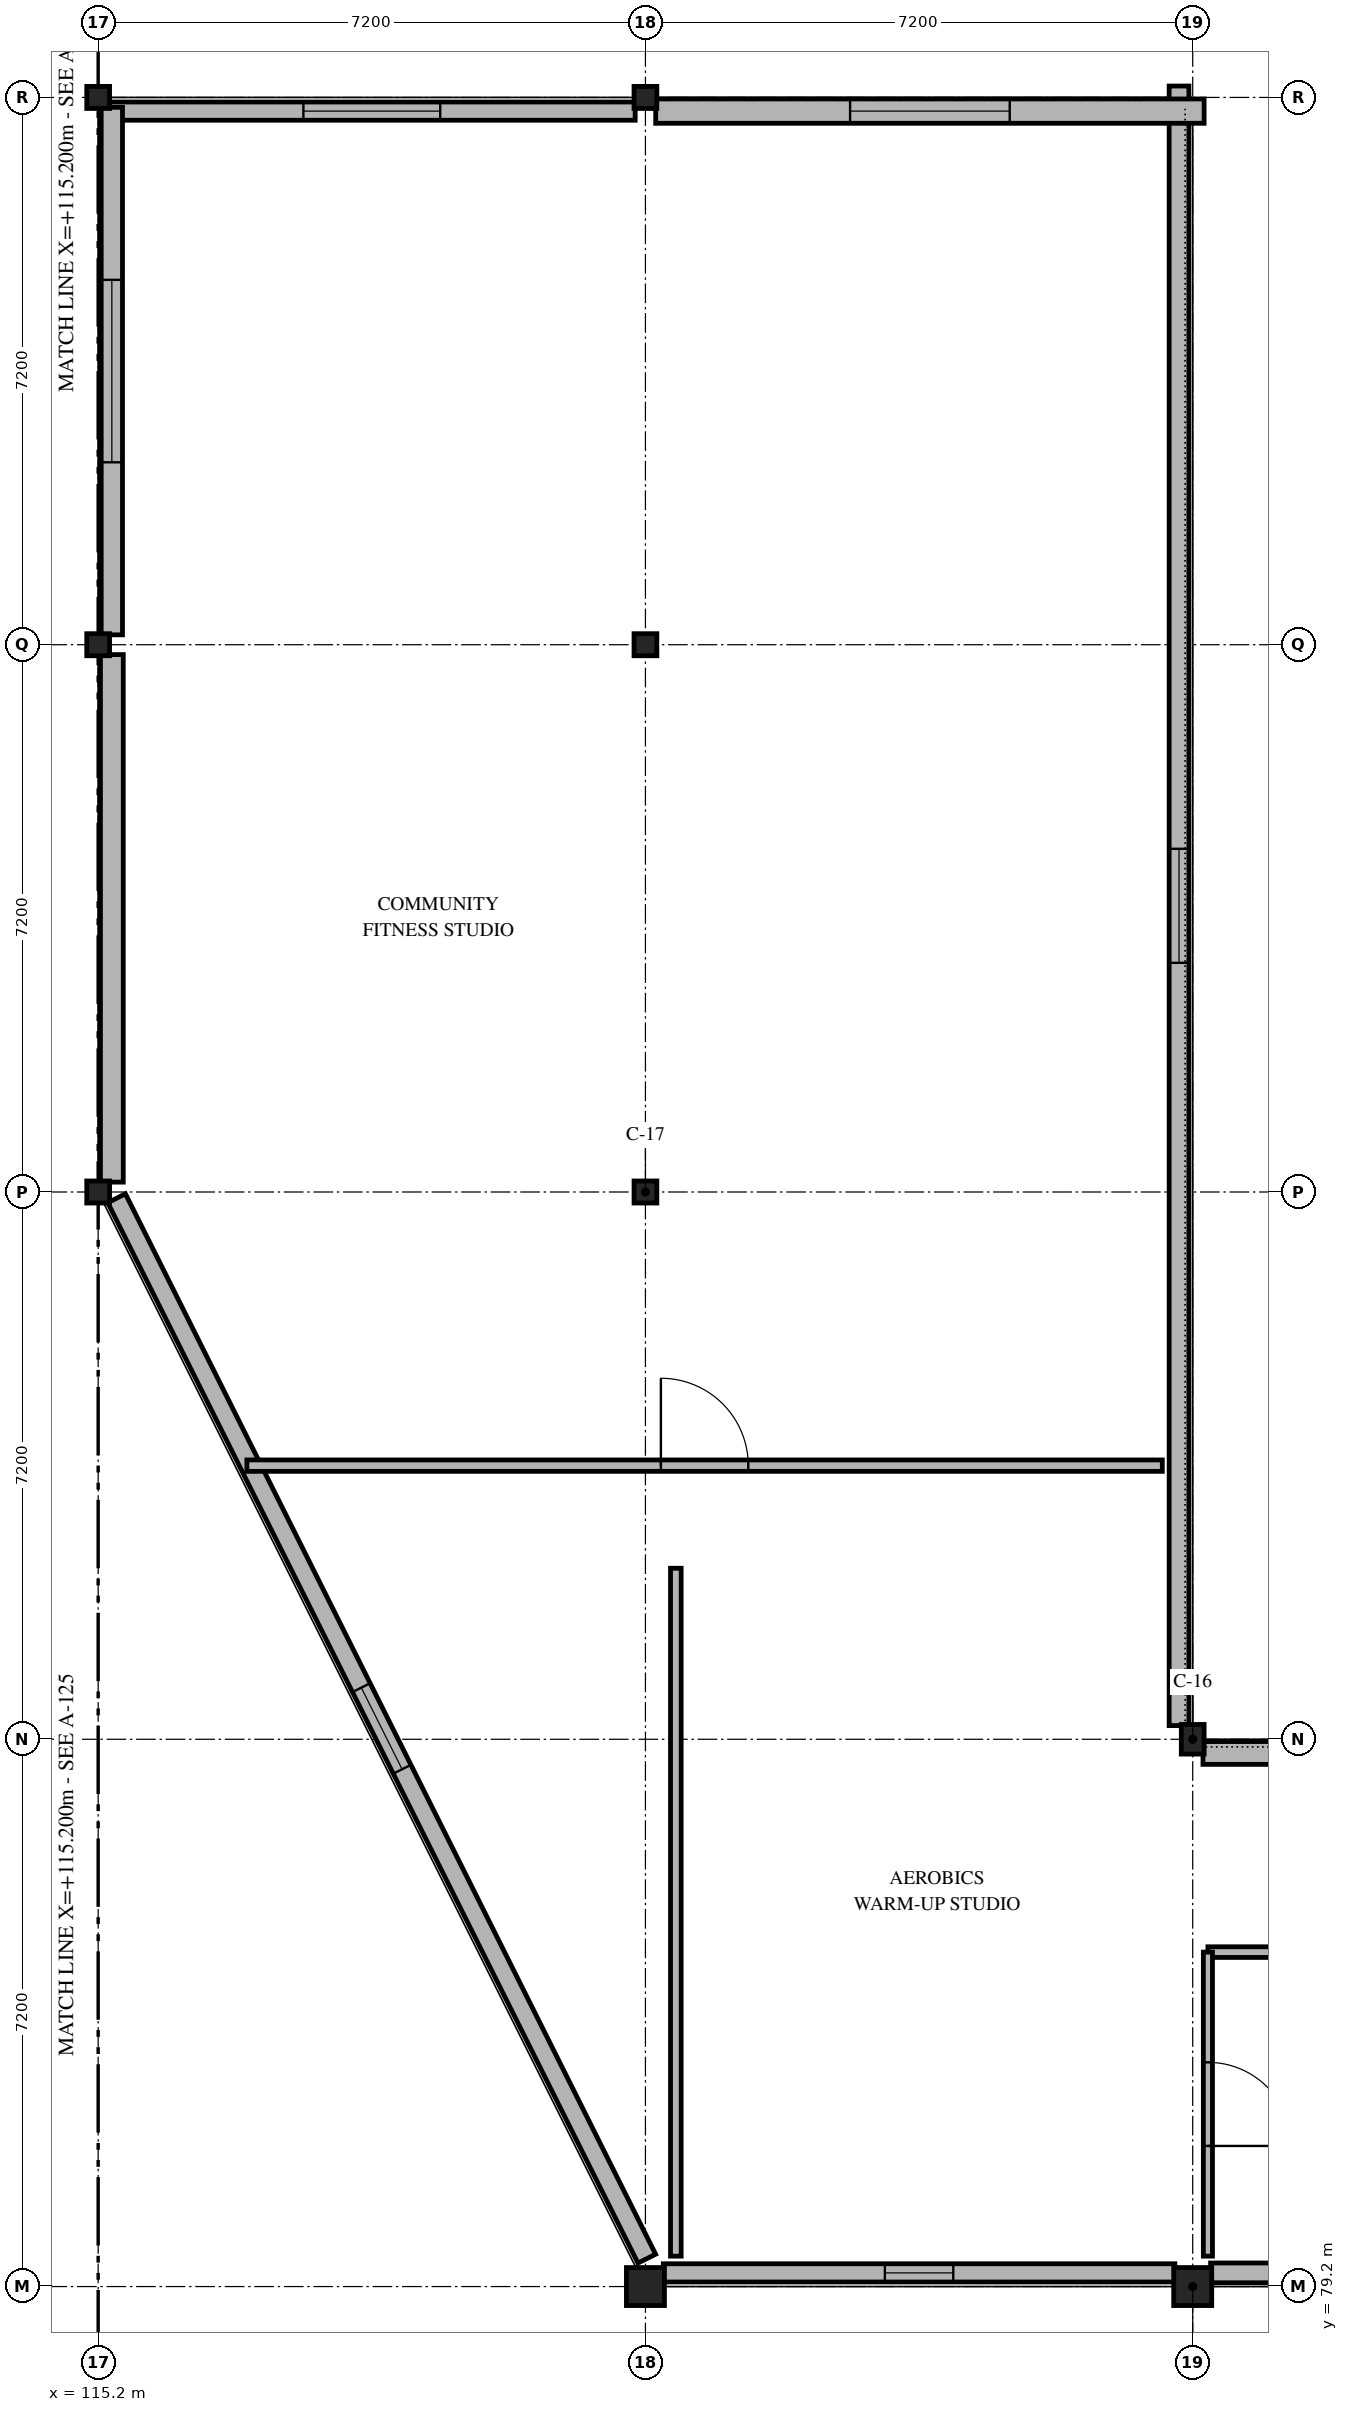
"""IFC4 building model, lengths in metres.
Left out: names, types, materials, properties, quantities, classifications, styles, units other than length and angle.
Written with IfcOpenShell. Run it as: python <this file> out.ifc"""

import sys

from ifc_helpers import new_model, si_unit, direction, frame, frame_2d, origin, origin_2d, place, context, subcontext, project, spatial, rectangle, i_section, extrude, element, fill, save


model = new_model("IFC4")
c1 = context("Model", 3, precision=1e-05, world=origin(), true_north=direction((0.0, 1.0)))
c2 = subcontext(c1, "Body", "Model", "MODEL_VIEW")
j1 = project(units=[si_unit("LENGTHUNIT", "METRE"), si_unit("PLANEANGLEUNIT", "RADIAN")], contexts=[c1])
p1 = place(None, origin())
s1 = spatial("IfcSite", under=j1, at=p1, CompositionType="ELEMENT")
p2 = place(p1, origin())
s2 = spatial("IfcBuilding", under=s1, at=p2, CompositionType="ELEMENT")
p3 = place(p2, frame((0.0, 0.0, 4.5)))
s3 = spatial("IfcBuildingStorey", under=s2, at=p3, CompositionType="ELEMENT", Elevation=4.5)
p4 = place(p3, frame((129.6, 86.4, 0.0), z_axis=(0.0, 0.0, 1.0), x_axis=(1.0, 0.0, 0.0)))
e1 = element("IfcColumn", 1, at=p4, inside=s3, PredefinedType="COLUMN", context=c2, shape_type="SweptSolid", body=[
    extrude(i_section(OverallWidth=0.3, OverallDepth=0.39, WebThickness=0.011, FlangeThickness=0.019, FilletRadius=0.027, at=origin_2d()), origin(), (0.0, 0.0, 1.0), 4.2),
])
p5 = place(p3, frame((129.6, 79.2, 0.0), z_axis=(0.0, 0.0, 1.0), x_axis=(1.0, 0.0, 0.0)))
e2 = element("IfcColumn", 2, at=p5, inside=s3, PredefinedType="COLUMN", context=c2, shape_type="SweptSolid", body=[
    extrude(rectangle(XDim=0.5, YDim=0.5, at=origin_2d()), origin(), (0.0, 0.0, 1.0), 4.2),
])
for number, where, z_axis, x_axis in (
    (3, (115.2, 93.6, 0.0), (0.0, 0.0, 1.0), (1.0, 0.0, 0.0)),
    (4, (122.4, 93.6, 0.0), (0.0, 0.0, 1.0), (1.0, 0.0, 0.0)),
    (5, (115.2, 100.8, 0.0), (0.0, 0.0, 1.0), (1.0, 0.0, 0.0)),
    (6, (122.4, 100.8, 0.0), (0.0, 0.0, 1.0), (1.0, 0.0, 0.0)),
    (7, (115.2, 108.0, 0.0), (0.0, 0.0, 1.0), (1.0, 0.0, 0.0)),
    (8, (122.4, 108.0, 0.0), (0.0, 0.0, 1.0), (1.0, 0.0, 0.0)),
):
    element("IfcColumn", number, at=place(p3, frame(where, z_axis=z_axis, x_axis=x_axis)), inside=s3, PredefinedType="COLUMN", context=c2, shape_type="SweptSolid", body=[
        extrude(i_section(OverallWidth=0.3, OverallDepth=0.29, WebThickness=0.009, FlangeThickness=0.014, FilletRadius=0.027, at=origin_2d()), origin(), (0.0, 0.0, 1.0), 4.2),
    ])
p6 = place(p3, frame((122.4, 79.2, 0.0), z_axis=(0.0, 0.0, 1.0), x_axis=(1.0, 0.0, 0.0)))
e9 = element("IfcColumn", 9, at=p6, inside=s3, PredefinedType="COLUMN", context=c2, shape_type="SweptSolid", body=[
    extrude(rectangle(XDim=0.5, YDim=0.5, at=origin_2d()), origin(), (0.0, 0.0, 1.0), 4.2),
])
p7 = place(p3, frame((135.365, 79.38, 0.0), z_axis=(0.0, 0.0, 1.0), x_axis=(-1.0, 0.0, 0.0)))
e10 = element("IfcWall", 10, at=p7, inside=s3, PredefinedType="SOLIDWALL", context=c2, shape_type="SweptSolid", body=[
    extrude(rectangle(XDim=5.53, YDim=0.26, at=frame_2d((2.765, 0.0))), origin(), (0.0, 0.0, 1.0), 3.59),
])
p8 = place(p7, frame((1.765, 0.0, 0.9)))
e11 = element("IfcOpeningElement", 11, at=p8, cuts=e10, PredefinedType="OPENING", context=c2, shape_type="SweptSolid", body=[
    extrude(rectangle(XDim=2.0, YDim=0.85, at=frame_2d((1.0, 0.425))), frame((0.0, 0.14, 0.0), z_axis=(0.0, -1.0, 0.0), x_axis=(1.0, 0.0, 0.0)), (0.0, 0.0, 1.0), 0.28),
])
p9 = place(p3, frame((129.365, 79.38, 0.0), z_axis=(0.0, 0.0, 1.0), x_axis=(-1.0, 0.0, 0.0)))
e12 = element("IfcWall", 12, at=p9, inside=s3, PredefinedType="SOLIDWALL", context=c2, shape_type="SweptSolid", body=[
    extrude(rectangle(XDim=6.73, YDim=0.24, at=frame_2d((3.365, 0.0))), origin(), (0.0, 0.0, 1.0), 3.5),
])
p10 = place(p9, frame((2.915, 0.0, 0.9)))
e13 = element("IfcOpeningElement", 13, at=p10, cuts=e12, PredefinedType="OPENING", context=c2, shape_type="SweptSolid", body=[
    extrude(rectangle(XDim=0.9, YDim=1.2, at=frame_2d((0.45, 0.6))), frame((0.0, 0.13, 0.0), z_axis=(0.0, -1.0, 0.0), x_axis=(1.0, 0.0, 0.0)), (0.0, 0.0, 1.0), 0.26),
])
p11 = place(p3, frame((129.735, 86.22, 0.0), z_axis=(0.0, 0.0, 1.0), x_axis=(1.0, 0.0, 0.0)))
e14 = element("IfcWall", 14, at=p11, inside=s3, PredefinedType="SOLIDWALL", context=c2, shape_type="SweptSolid", body=[
    extrude(rectangle(XDim=5.73, YDim=0.3, at=frame_2d((2.865, 0.0))), origin(), (0.0, 0.0, 1.0), 3.55),
])
p12 = place(p11, frame((2.265, 0.0, 0.9)))
e15 = element("IfcOpeningElement", 15, at=p12, cuts=e14, PredefinedType="OPENING", context=c2, shape_type="SweptSolid", body=[
    extrude(rectangle(XDim=1.2, YDim=1.2, at=frame_2d((0.6, 0.6))), frame((0.0, 0.16, 0.0), z_axis=(0.0, -1.0, 0.0), x_axis=(1.0, 0.0, 0.0)), (0.0, 0.0, 1.0), 0.32),
])
p13 = place(p3, frame((129.42, 108.15, 0.0), z_axis=(0.0, 0.0, 1.0), x_axis=(0.0, -1.0, 0.0)))
e16 = element("IfcWall", 16, at=p13, inside=s3, PredefinedType="SOLIDWALL", context=c2, shape_type="SweptSolid", body=[
    extrude(rectangle(XDim=21.57, YDim=0.26, at=frame_2d((10.785, 0.0))), origin(), (0.0, 0.0, 1.0), 3.95),
])
p14 = place(p13, frame((10.035, 0.0, 0.9)))
e17 = element("IfcOpeningElement", 17, at=p14, cuts=e16, PredefinedType="OPENING", context=c2, shape_type="SweptSolid", body=[
    extrude(rectangle(XDim=1.5, YDim=1.35, at=frame_2d((0.75, 0.675))), frame((0.0, 0.14, 0.0), z_axis=(0.0, -1.0, 0.0), x_axis=(1.0, 0.0, 0.0)), (0.0, 0.0, 1.0), 0.28),
])
p15 = place(p3, frame((115.335, 107.82, 0.0), z_axis=(0.0, 0.0, 1.0), x_axis=(1.0, 0.0, 0.0)))
e18 = element("IfcWall", 18, at=p15, inside=s3, PredefinedType="SOLIDWALL", context=c2, shape_type="SweptSolid", body=[
    extrude(rectangle(XDim=6.93, YDim=0.24, at=frame_2d((3.465, 0.0))), origin(), (0.0, 0.0, 1.0), 3.95),
])
p16 = place(p15, frame((2.565, 0.0, 0.9)))
e19 = element("IfcOpeningElement", 19, at=p16, cuts=e18, PredefinedType="OPENING", context=c2, shape_type="SweptSolid", body=[
    extrude(rectangle(XDim=1.8, YDim=1.35, at=frame_2d((0.9, 0.675))), frame((0.0, 0.13, 0.0), z_axis=(0.0, -1.0, 0.0), x_axis=(1.0, 0.0, 0.0)), (0.0, 0.0, 1.0), 0.26),
])
p17 = place(p3, frame((122.535, 107.82, 0.0), z_axis=(0.0, 0.0, 1.0), x_axis=(1.0, 0.0, 0.0)))
e20 = element("IfcWall", 20, at=p17, inside=s3, PredefinedType="SOLIDWALL", context=c2, shape_type="SweptSolid", body=[
    extrude(rectangle(XDim=7.215, YDim=0.32, at=frame_2d((3.607, 0.0))), origin(), (0.0, 0.0, 1.0), 3.95),
])
p18 = place(p17, frame((2.558, 0.0, 0.9)))
e21 = element("IfcOpeningElement", 21, at=p18, cuts=e20, PredefinedType="OPENING", context=c2, shape_type="SweptSolid", body=[
    extrude(rectangle(XDim=2.1, YDim=1.35, at=frame_2d((1.05, 0.675))), frame((0.0, 0.17, 0.0), z_axis=(0.0, -1.0, 0.0), x_axis=(1.0, 0.0, 0.0)), (0.0, 0.0, 1.0), 0.34),
])
p19 = place(p3, frame((115.38, 93.73, 0.0), z_axis=(0.0, 0.0, 1.0), x_axis=(0.0, 1.0, 0.0)))
e22 = element("IfcWall", 22, at=p19, inside=s3, PredefinedType="SOLIDWALL", context=c2, shape_type="SweptSolid", body=[
    extrude(rectangle(XDim=6.94, YDim=0.3, at=frame_2d((3.47, 0.0))), origin(), (0.0, 0.0, 1.0), 3.95),
])
p20 = place(p3, frame((115.38, 100.93, 0.0), z_axis=(0.0, 0.0, 1.0), x_axis=(0.0, 1.0, 0.0)))
e23 = element("IfcWall", 23, at=p20, inside=s3, PredefinedType="SOLIDWALL", context=c2, shape_type="SweptSolid", body=[
    extrude(rectangle(XDim=6.94, YDim=0.28, at=frame_2d((3.47, 0.0))), origin(), (0.0, 0.0, 1.0), 3.95),
])
p21 = place(p20, frame((2.27, 0.0, 0.9)))
e24 = element("IfcOpeningElement", 24, at=p21, cuts=e23, PredefinedType="OPENING", context=c2, shape_type="SweptSolid", body=[
    extrude(rectangle(XDim=2.4, YDim=1.35, at=frame_2d((1.2, 0.675))), frame((0.0, 0.15, 0.0), z_axis=(0.0, -1.0, 0.0), x_axis=(1.0, 0.0, 0.0)), (0.0, 0.0, 1.0), 0.3),
])
p22 = place(p3, frame((122.418, 79.567, 0.0), z_axis=(0.0, 0.0, 1.0), x_axis=(-0.4472135955, 0.894427191, 0.0)))
e25 = element("IfcWall", 25, at=p22, inside=s3, PredefinedType="SOLIDWALL", context=c2, shape_type="SweptSolid", body=[
    extrude(rectangle(XDim=15.597, YDim=0.26, at=frame_2d((7.799, 0.0))), origin(), (0.0, 0.0, 1.0), 3.95),
])
p23 = place(p22, frame((7.199, 0.0, 0.75)))
e26 = element("IfcOpeningElement", 26, at=p23, cuts=e25, PredefinedType="OPENING", context=c2, shape_type="SweptSolid", body=[
    extrude(rectangle(XDim=1.2, YDim=1.5, at=frame_2d((0.6, 0.75))), frame((0.0, 0.14, 0.0), z_axis=(0.0, -1.0, 0.0), x_axis=(1.0, 0.0, 0.0)), (0.0, 0.0, 1.0), 0.28),
])
p24 = place(p3, frame((157.8, 83.6, 0.0), z_axis=(0.0, 0.0, 1.0), x_axis=(-1.0, 0.0, 0.0)))
e27 = element("IfcWall", 27, at=p24, inside=s3, PredefinedType="PARTITIONING", context=c2, shape_type="SweptSolid", body=[
    extrude(rectangle(XDim=28.0, YDim=0.14, at=frame_2d((14.0, 0.0))), origin(), (0.0, 0.0, 1.0), 3.55),
])
p25 = place(p24, frame((13.375, 0.0, 0.0)))
e28 = element("IfcOpeningElement", 28, at=p25, cuts=e27, PredefinedType="OPENING", context=c2, shape_type="SweptSolid", body=[
    extrude(rectangle(XDim=1.25, YDim=2.2, at=frame_2d((0.625, 1.1))), frame((0.0, 0.08, 0.0), z_axis=(0.0, -1.0, 0.0), x_axis=(1.0, 0.0, 0.0)), (0.0, 0.0, 1.0), 0.16),
])
p26 = place(p3, frame((129.8, 83.6, 0.0), z_axis=(0.0, 0.0, 1.0), x_axis=(0.0, -1.0, 0.0)))
e29 = element("IfcWall", 29, at=p26, inside=s3, PredefinedType="PARTITIONING", context=c2, shape_type="SweptSolid", body=[
    extrude(rectangle(XDim=4.0, YDim=0.12, at=frame_2d((2.0, 0.0))), origin(), (0.0, 0.0, 1.0), 3.65),
])
p27 = place(p26, frame((1.45, 0.0, 0.0)))
e30 = element("IfcOpeningElement", 30, at=p27, cuts=e29, PredefinedType="OPENING", context=c2, shape_type="SweptSolid", body=[
    extrude(rectangle(XDim=1.1, YDim=2.15, at=frame_2d((0.55, 1.075))), frame((0.0, 0.07, 0.0), z_axis=(0.0, -1.0, 0.0), x_axis=(1.0, 0.0, 0.0)), (0.0, 0.0, 1.0), 0.14),
])
p28 = place(p3, frame((117.156, 90.0, 0.0), z_axis=(0.0, 0.0, 1.0), x_axis=(1.0, 0.0, 0.0)))
e31 = element("IfcWall", 31, at=p28, inside=s3, PredefinedType="PARTITIONING", context=c2, shape_type="SweptSolid", body=[
    extrude(rectangle(XDim=12.043, YDim=0.15, at=frame_2d((6.022, 0.0))), origin(), (0.0, 0.0, 1.0), 3.95),
])
p29 = place(p28, frame((5.447, 0.0, 0.0)))
e32 = element("IfcOpeningElement", 32, at=p29, cuts=e31, PredefinedType="OPENING", context=c2, shape_type="SweptSolid", body=[
    extrude(rectangle(XDim=1.15, YDim=2.15, at=frame_2d((0.575, 1.075))), frame((0.0, 0.085, 0.0), z_axis=(0.0, -1.0, 0.0), x_axis=(1.0, 0.0, 0.0)), (0.0, 0.0, 1.0), 0.17),
])
p30 = place(p3, frame((122.8, 88.65, 0.0), z_axis=(0.0, 0.0, 1.0), x_axis=(0.0, -1.0, 0.0)))
e33 = element("IfcWall", 33, at=p30, inside=s3, PredefinedType="PARTITIONING", context=c2, shape_type="SweptSolid", body=[
    extrude(rectangle(XDim=9.05, YDim=0.14, at=frame_2d((4.525, 0.0))), origin(), (0.0, 0.0, 1.0), 3.95),
])
p31 = place(p10, origin())
e34 = element("IfcWindow", 34, at=p31, inside=s3, PartitioningType="SINGLE_PANEL", PredefinedType="WINDOW", context=c2, shape_type="SweptSolid", body=[
    extrude(rectangle(XDim=0.9, YDim=1.2, at=frame_2d((0.45, 0.6))), frame((0.0, 0.03, 0.0), z_axis=(0.0, -1.0, 0.0), x_axis=(1.0, 0.0, 0.0)), (0.0, 0.0, 1.0), 0.06),
])
fill(e13, e34)
p32 = place(p14, origin())
e35 = element("IfcWindow", 35, at=p32, inside=s3, PartitioningType="SINGLE_PANEL", PredefinedType="WINDOW", context=c2, shape_type="SweptSolid", body=[
    extrude(rectangle(XDim=1.5, YDim=1.35, at=frame_2d((0.75, 0.675))), frame((0.0, 0.03, 0.0), z_axis=(0.0, -1.0, 0.0), x_axis=(1.0, 0.0, 0.0)), (0.0, 0.0, 1.0), 0.06),
])
fill(e17, e35)
p33 = place(p16, origin())
e36 = element("IfcWindow", 36, at=p33, inside=s3, PartitioningType="SINGLE_PANEL", PredefinedType="WINDOW", context=c2, shape_type="SweptSolid", body=[
    extrude(rectangle(XDim=1.8, YDim=1.35, at=frame_2d((0.9, 0.675))), frame((0.0, 0.03, 0.0), z_axis=(0.0, -1.0, 0.0), x_axis=(1.0, 0.0, 0.0)), (0.0, 0.0, 1.0), 0.06),
])
fill(e19, e36)
p34 = place(p18, origin())
e37 = element("IfcWindow", 37, at=p34, inside=s3, PartitioningType="SINGLE_PANEL", PredefinedType="WINDOW", context=c2, shape_type="SweptSolid", body=[
    extrude(rectangle(XDim=2.1, YDim=1.35, at=frame_2d((1.05, 0.675))), frame((0.0, 0.03, 0.0), z_axis=(0.0, -1.0, 0.0), x_axis=(1.0, 0.0, 0.0)), (0.0, 0.0, 1.0), 0.06),
])
fill(e21, e37)
p35 = place(p21, origin())
e38 = element("IfcWindow", 38, at=p35, inside=s3, PartitioningType="SINGLE_PANEL", PredefinedType="WINDOW", context=c2, shape_type="SweptSolid", body=[
    extrude(rectangle(XDim=2.4, YDim=1.35, at=frame_2d((1.2, 0.675))), frame((0.0, 0.03, 0.0), z_axis=(0.0, -1.0, 0.0), x_axis=(1.0, 0.0, 0.0)), (0.0, 0.0, 1.0), 0.06),
])
fill(e24, e38)
p36 = place(p23, origin())
e39 = element("IfcWindow", 39, at=p36, inside=s3, PartitioningType="SINGLE_PANEL", PredefinedType="WINDOW", context=c2, shape_type="SweptSolid", body=[
    extrude(rectangle(XDim=1.2, YDim=1.5, at=frame_2d((0.6, 0.75))), frame((0.0, 0.03, 0.0), z_axis=(0.0, -1.0, 0.0), x_axis=(1.0, 0.0, 0.0)), (0.0, 0.0, 1.0), 0.06),
])
fill(e26, e39)
p37 = place(p29, origin())
e40 = element("IfcDoor", 40, at=p37, inside=s3, OperationType="SINGLE_SWING_LEFT", PredefinedType="DOOR", context=c2, shape_type="SweptSolid", body=[
    extrude(rectangle(XDim=1.15, YDim=2.15, at=frame_2d((0.575, 1.075))), frame((0.0, 0.025, 0.0), z_axis=(0.0, -1.0, 0.0), x_axis=(1.0, 0.0, 0.0)), (0.0, 0.0, 1.0), 0.05),
])
fill(e32, e40)
p38 = place(p27, origin())
e41 = element("IfcDoor", 41, at=p38, inside=s3, OperationType="SINGLE_SWING_RIGHT", PredefinedType="DOOR", context=c2, shape_type="SweptSolid", body=[
    extrude(rectangle(XDim=1.1, YDim=2.15, at=frame_2d((0.55, 1.075))), frame((0.0, 0.025, 0.0), z_axis=(0.0, -1.0, 0.0), x_axis=(1.0, 0.0, 0.0)), (0.0, 0.0, 1.0), 0.05),
])
fill(e30, e41)
save(model, sys.argv[1])
